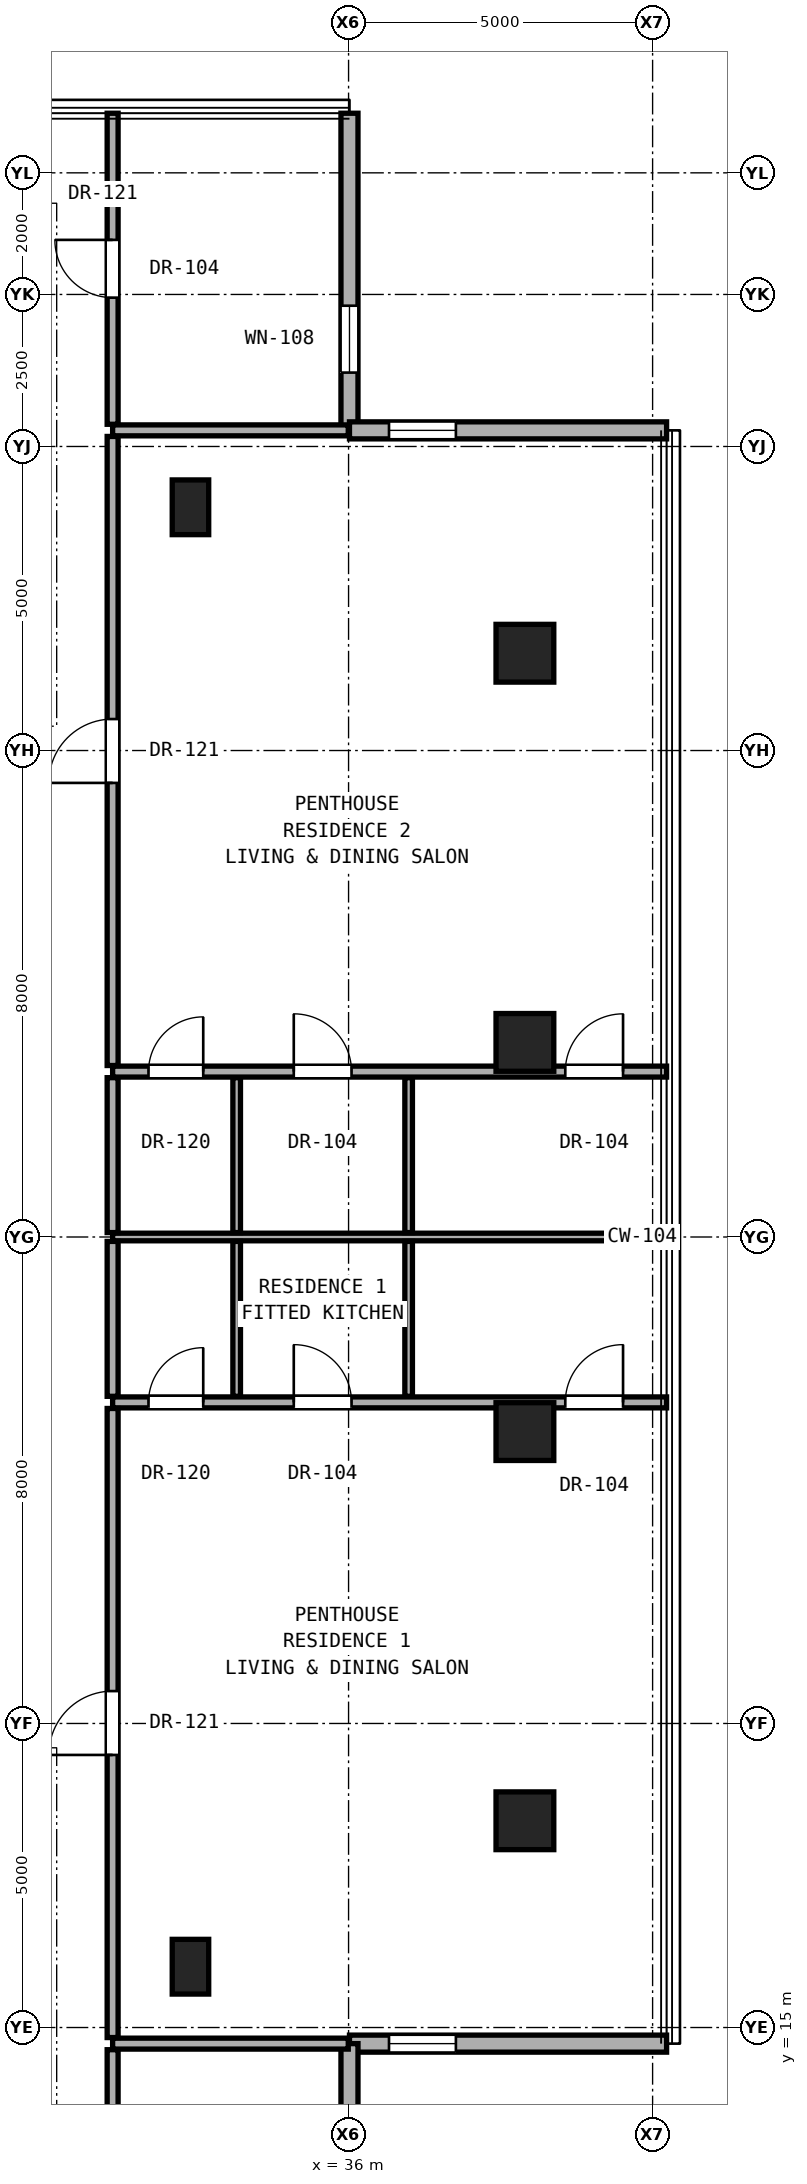
"""IFC4 building model, lengths in metres.
Left out: names, types, materials, properties, quantities, classifications, styles, units other than length and angle.
Written with IfcOpenShell. Run it as: python <this file> out.ifc"""

import sys

from ifc_helpers import new_model, si_unit, direction, frame, frame_2d, origin, origin_2d, place, context, subcontext, project, spatial, rectangle, hollow_rectangle, extrude, element, fill, save


model = new_model("IFC4")
c1 = context("Model", 3, precision=1e-05, world=origin(), true_north=direction((0.0, 1.0)))
c2 = subcontext(c1, "Body", "Model", "MODEL_VIEW")
j1 = project(units=[si_unit("LENGTHUNIT", "METRE"), si_unit("PLANEANGLEUNIT", "RADIAN")], contexts=[c1])
p1 = place(None, origin())
s1 = spatial("IfcSite", under=j1, at=p1, CompositionType="ELEMENT")
p2 = place(p1, origin())
s2 = spatial("IfcBuilding", under=s1, at=p2, CompositionType="ELEMENT")
p3 = place(p2, frame((0.0, 0.0, 199.9)))
s3 = spatial("IfcBuildingStorey", under=s2, at=p3, CompositionType="ELEMENT", Elevation=199.9)
for number, where, z_axis, x_axis in (
    (1, (38.9, 18.4, 0.0), (0.0, 0.0, 1.0), (1.0, 0.0, 0.0)),
    (2, (38.9, 24.8, 0.0), (0.0, 0.0, 1.0), (1.0, 0.0, 0.0)),
    (3, (38.9, 31.2, 0.0), (0.0, 0.0, 1.0), (1.0, 0.0, 0.0)),
    (4, (38.9, 37.6, 0.0), (0.0, 0.0, 1.0), (1.0, 0.0, 0.0)),
):
    element("IfcColumn", number, at=place(p3, frame(where, z_axis=z_axis, x_axis=x_axis)), inside=s3, PredefinedType="COLUMN", context=c2, shape_type="SweptSolid", body=[
        extrude(hollow_rectangle(XDim=0.95, YDim=0.95, WallThickness=0.05, at=origin_2d()), origin(), (0.0, 0.0, 1.0), 3.25),
    ])
for number, where, z_axis, x_axis in (
    (5, (33.4, 16.0, 0.0), (0.0, 0.0, 1.0), (1.0, 0.0, 0.0)),
    (6, (33.4, 40.0, 0.0), (0.0, 0.0, 1.0), (1.0, 0.0, 0.0)),
):
    element("IfcColumn", number, at=place(p3, frame(where, z_axis=z_axis, x_axis=x_axis)), inside=s3, PredefinedType="PILASTER", context=c2, shape_type="SweptSolid", body=[
        extrude(rectangle(XDim=0.6, YDim=0.9, at=origin_2d()), origin(), (0.0, 0.0, 1.0), 3.25),
    ])
p4 = place(p3, frame((36.015, 41.265, 0.0), z_axis=(0.0, 0.0, 1.0), x_axis=(0.0, 1.0, 0.0)))
e7 = element("IfcWall", 7, at=p4, inside=s3, PredefinedType="SOLIDWALL", context=c2, shape_type="SweptSolid", body=[
    extrude(rectangle(XDim=5.215, YDim=0.28, at=frame_2d((2.607, 0.0))), origin(), (0.0, 0.0, 1.0), 3.03),
])
p5 = place(p4, frame((0.95, 0.0, 0.85)))
e8 = element("IfcOpeningElement", 8, at=p5, cuts=e7, PredefinedType="OPENING", context=c2, shape_type="SweptSolid", body=[
    extrude(rectangle(XDim=1.1, YDim=2.0, at=frame_2d((0.55, 1.0))), frame((0.0, 0.15, 0.0), z_axis=(0.0, -1.0, 0.0), x_axis=(1.0, 0.0, 0.0)), (0.0, 0.0, 1.0), 0.3),
])
p6 = place(p3, frame((36.015, 14.735, 0.0), z_axis=(0.0, 0.0, 1.0), x_axis=(1.0, 0.0, 0.0)))
e9 = element("IfcWall", 9, at=p6, inside=s3, PredefinedType="SOLIDWALL", context=c2, shape_type="SweptSolid", body=[
    extrude(rectangle(XDim=5.215, YDim=0.28, at=frame_2d((2.607, 0.0))), origin(), (0.0, 0.0, 1.0), 3.03),
])
p7 = place(p6, frame((0.65, 0.0, 0.85)))
e10 = element("IfcOpeningElement", 10, at=p7, cuts=e9, PredefinedType="OPENING", context=c2, shape_type="SweptSolid", body=[
    extrude(rectangle(XDim=1.1, YDim=2.0, at=frame_2d((0.55, 1.0))), frame((0.0, 0.15, 0.0), z_axis=(0.0, -1.0, 0.0), x_axis=(1.0, 0.0, 0.0)), (0.0, 0.0, 1.0), 0.3),
])
p8 = place(p3, frame((36.015, 9.52, 0.0), z_axis=(0.0, 0.0, 1.0), x_axis=(0.0, 1.0, 0.0)))
e11 = element("IfcWall", 11, at=p8, inside=s3, PredefinedType="SOLIDWALL", context=c2, shape_type="SweptSolid", body=[
    extrude(rectangle(XDim=5.215, YDim=0.28, at=frame_2d((2.607, 0.0))), origin(), (0.0, 0.0, 1.0), 3.03),
])
p9 = place(p3, frame((41.23, 41.265, 0.0), z_axis=(0.0, 0.0, 1.0), x_axis=(-1.0, 0.0, 0.0)))
e12 = element("IfcWall", 12, at=p9, inside=s3, PredefinedType="SOLIDWALL", context=c2, shape_type="SweptSolid", body=[
    extrude(rectangle(XDim=5.215, YDim=0.28, at=frame_2d((2.607, 0.0))), origin(), (0.0, 0.0, 1.0), 3.03),
])
p10 = place(p9, frame((3.465, 0.0, 0.85)))
e13 = element("IfcOpeningElement", 13, at=p10, cuts=e12, PredefinedType="OPENING", context=c2, shape_type="SweptSolid", body=[
    extrude(rectangle(XDim=1.1, YDim=2.0, at=frame_2d((0.55, 1.0))), frame((0.0, 0.15, 0.0), z_axis=(0.0, -1.0, 0.0), x_axis=(1.0, 0.0, 0.0)), (0.0, 0.0, 1.0), 0.3),
])
p11 = place(p3, frame((32.12, 14.735, 0.0), z_axis=(0.0, 0.0, 1.0), x_axis=(1.0, 0.0, 0.0)))
e14 = element("IfcWall", 14, at=p11, inside=s3, PredefinedType="PARTITIONING", context=c2, shape_type="SweptSolid", body=[
    extrude(rectangle(XDim=3.875, YDim=0.18, at=frame_2d((1.938, 0.0))), origin(), (0.0, 0.0, 1.0), 3.05),
])
p12 = place(p3, frame((32.12, 25.28, 0.0), z_axis=(0.0, 0.0, 1.0), x_axis=(1.0, 0.0, 0.0)))
e15 = element("IfcWall", 15, at=p12, inside=s3, PredefinedType="PARTITIONING", context=c2, shape_type="SweptSolid", body=[
    extrude(rectangle(XDim=9.11, YDim=0.18, at=frame_2d((4.555, 0.0))), origin(), (0.0, 0.0, 1.0), 2.269),
])
p13 = place(p12, frame((7.444, 0.0, 0.0)))
e16 = element("IfcOpeningElement", 16, at=p13, cuts=e15, PredefinedType="OPENING", context=c2, shape_type="SweptSolid", body=[
    extrude(rectangle(XDim=0.95, YDim=2.15, at=frame_2d((0.475, 1.075))), frame((0.0, 0.1, 0.0), z_axis=(0.0, -1.0, 0.0), x_axis=(1.0, 0.0, 0.0)), (0.0, 0.0, 1.0), 0.2),
])
p14 = place(p12, frame((2.979, 0.0, 0.0)))
e17 = element("IfcOpeningElement", 17, at=p14, cuts=e15, PredefinedType="OPENING", context=c2, shape_type="SweptSolid", body=[
    extrude(rectangle(XDim=0.95, YDim=2.15, at=frame_2d((0.475, 1.075))), frame((0.0, 0.1, 0.0), z_axis=(0.0, -1.0, 0.0), x_axis=(1.0, 0.0, 0.0)), (0.0, 0.0, 1.0), 0.2),
])
p15 = place(p12, frame((0.59, 0.0, 0.0)))
e18 = element("IfcOpeningElement", 18, at=p15, cuts=e15, PredefinedType="OPENING", context=c2, shape_type="SweptSolid", body=[
    extrude(rectangle(XDim=0.9, YDim=2.1, at=frame_2d((0.45, 1.05))), frame((0.0, 0.1, 0.0), z_axis=(0.0, -1.0, 0.0), x_axis=(1.0, 0.0, 0.0)), (0.0, 0.0, 1.0), 0.2),
])
p16 = place(p3, frame((32.12, 28.0, 0.0), z_axis=(0.0, 0.0, 1.0), x_axis=(1.0, 0.0, 0.0)))
e19 = element("IfcWall", 19, at=p16, inside=s3, PredefinedType="PARTITIONING", context=c2, shape_type="SweptSolid", body=[
    extrude(rectangle(XDim=9.11, YDim=0.125, at=frame_2d((4.555, 0.0))), origin(), (0.0, 0.0, 1.0), 2.269),
])
p17 = place(p3, frame((32.12, 30.72, 0.0), z_axis=(0.0, 0.0, 1.0), x_axis=(1.0, 0.0, 0.0)))
e20 = element("IfcWall", 20, at=p17, inside=s3, PredefinedType="PARTITIONING", context=c2, shape_type="SweptSolid", body=[
    extrude(rectangle(XDim=9.11, YDim=0.18, at=frame_2d((4.555, 0.0))), origin(), (0.0, 0.0, 1.0), 2.269),
])
p18 = place(p17, frame((7.444, 0.0, 0.0)))
e21 = element("IfcOpeningElement", 21, at=p18, cuts=e20, PredefinedType="OPENING", context=c2, shape_type="SweptSolid", body=[
    extrude(rectangle(XDim=0.95, YDim=2.15, at=frame_2d((0.475, 1.075))), frame((0.0, 0.1, 0.0), z_axis=(0.0, -1.0, 0.0), x_axis=(1.0, 0.0, 0.0)), (0.0, 0.0, 1.0), 0.2),
])
p19 = place(p17, frame((2.979, 0.0, 0.0)))
e22 = element("IfcOpeningElement", 22, at=p19, cuts=e20, PredefinedType="OPENING", context=c2, shape_type="SweptSolid", body=[
    extrude(rectangle(XDim=0.95, YDim=2.15, at=frame_2d((0.475, 1.075))), frame((0.0, 0.1, 0.0), z_axis=(0.0, -1.0, 0.0), x_axis=(1.0, 0.0, 0.0)), (0.0, 0.0, 1.0), 0.2),
])
p20 = place(p17, frame((0.59, 0.0, 0.0)))
e23 = element("IfcOpeningElement", 23, at=p20, cuts=e20, PredefinedType="OPENING", context=c2, shape_type="SweptSolid", body=[
    extrude(rectangle(XDim=0.9, YDim=2.1, at=frame_2d((0.45, 1.05))), frame((0.0, 0.1, 0.0), z_axis=(0.0, -1.0, 0.0), x_axis=(1.0, 0.0, 0.0)), (0.0, 0.0, 1.0), 0.2),
])
p21 = place(p3, frame((32.12, 41.265, 0.0), z_axis=(0.0, 0.0, 1.0), x_axis=(1.0, 0.0, 0.0)))
e24 = element("IfcWall", 24, at=p21, inside=s3, PredefinedType="PARTITIONING", context=c2, shape_type="SweptSolid", body=[
    extrude(rectangle(XDim=3.875, YDim=0.18, at=frame_2d((1.938, 0.0))), origin(), (0.0, 0.0, 1.0), 3.05),
])
p22 = place(p3, frame((32.12, 9.52, 0.0), z_axis=(0.0, 0.0, 1.0), x_axis=(0.0, 1.0, 0.0)))
e25 = element("IfcWall", 25, at=p22, inside=s3, PredefinedType="PARTITIONING", context=c2, shape_type="SweptSolid", body=[
    extrude(rectangle(XDim=5.115, YDim=0.18, at=frame_2d((2.558, 0.0))), origin(), (0.0, 0.0, 1.0), 3.05),
])
p23 = place(p22, frame((2.083, 0.0, 0.0)))
e26 = element("IfcOpeningElement", 26, at=p23, cuts=e25, PredefinedType="OPENING", context=c2, shape_type="SweptSolid", body=[
    extrude(rectangle(XDim=0.95, YDim=2.15, at=frame_2d((0.475, 1.075))), frame((0.0, 0.1, 0.0), z_axis=(0.0, -1.0, 0.0), x_axis=(1.0, 0.0, 0.0)), (0.0, 0.0, 1.0), 0.2),
])
p24 = place(p3, frame((32.12, 14.835, 0.0), z_axis=(0.0, 0.0, 1.0), x_axis=(0.0, 1.0, 0.0)))
e27 = element("IfcWall", 27, at=p24, inside=s3, PredefinedType="PARTITIONING", context=c2, shape_type="SweptSolid", body=[
    extrude(rectangle(XDim=10.345, YDim=0.18, at=frame_2d((5.172, 0.0))), origin(), (0.0, 0.0, 1.0), 2.346),
])
p25 = place(p24, frame((4.647, 0.0, 0.0)))
e28 = element("IfcOpeningElement", 28, at=p25, cuts=e27, PredefinedType="OPENING", context=c2, shape_type="SweptSolid", body=[
    extrude(rectangle(XDim=1.05, YDim=2.2, at=frame_2d((0.525, 1.1))), frame((0.0, 0.1, 0.0), z_axis=(0.0, -1.0, 0.0), x_axis=(1.0, 0.0, 0.0)), (0.0, 0.0, 1.0), 0.2),
])
for number, where, z_axis, x_axis in (
    (29, (32.12, 25.38, 0.0), (0.0, 0.0, 1.0), (0.0, 1.0, 0.0)),
    (30, (32.12, 28.073, 0.0), (0.0, 0.0, 1.0), (0.0, 1.0, 0.0)),
):
    element("IfcWall", number, at=place(p3, frame(where, z_axis=z_axis, x_axis=x_axis)), inside=s3, PredefinedType="PARTITIONING", context=c2, shape_type="SweptSolid", body=[
        extrude(rectangle(XDim=2.548, YDim=0.18, at=frame_2d((1.274, 0.0))), origin(), (0.0, 0.0, 1.0), 3.05),
    ])
p26 = place(p3, frame((32.12, 30.82, 0.0), z_axis=(0.0, 0.0, 1.0), x_axis=(0.0, 1.0, 0.0)))
e31 = element("IfcWall", 31, at=p26, inside=s3, PredefinedType="PARTITIONING", context=c2, shape_type="SweptSolid", body=[
    extrude(rectangle(XDim=10.345, YDim=0.18, at=frame_2d((5.172, 0.0))), origin(), (0.0, 0.0, 1.0), 2.346),
])
p27 = place(p26, frame((4.647, 0.0, 0.0)))
e32 = element("IfcOpeningElement", 32, at=p27, cuts=e31, PredefinedType="OPENING", context=c2, shape_type="SweptSolid", body=[
    extrude(rectangle(XDim=1.05, YDim=2.2, at=frame_2d((0.525, 1.1))), frame((0.0, 0.1, 0.0), z_axis=(0.0, -1.0, 0.0), x_axis=(1.0, 0.0, 0.0)), (0.0, 0.0, 1.0), 0.2),
])
p28 = place(p3, frame((32.12, 41.365, 0.0), z_axis=(0.0, 0.0, 1.0), x_axis=(0.0, 1.0, 0.0)))
e33 = element("IfcWall", 33, at=p28, inside=s3, PredefinedType="PARTITIONING", context=c2, shape_type="SweptSolid", body=[
    extrude(rectangle(XDim=5.115, YDim=0.18, at=frame_2d((2.558, 0.0))), origin(), (0.0, 0.0, 1.0), 3.05),
])
p29 = place(p28, frame((2.083, 0.0, 0.0)))
e34 = element("IfcOpeningElement", 34, at=p29, cuts=e33, PredefinedType="OPENING", context=c2, shape_type="SweptSolid", body=[
    extrude(rectangle(XDim=0.95, YDim=2.15, at=frame_2d((0.475, 1.075))), frame((0.0, 0.1, 0.0), z_axis=(0.0, -1.0, 0.0), x_axis=(1.0, 0.0, 0.0)), (0.0, 0.0, 1.0), 0.2),
])
for number, where, z_axis, x_axis in (
    (35, (34.16, 25.38, 0.0), (0.0, 0.0, 1.0), (0.0, 1.0, 0.0)),
    (36, (34.16, 28.073, 0.0), (0.0, 0.0, 1.0), (0.0, 1.0, 0.0)),
    (37, (36.988, 25.38, 0.0), (0.0, 0.0, 1.0), (0.0, 1.0, 0.0)),
    (38, (36.988, 28.073, 0.0), (0.0, 0.0, 1.0), (0.0, 1.0, 0.0)),
):
    element("IfcWall", number, at=place(p3, frame(where, z_axis=z_axis, x_axis=x_axis)), inside=s3, PredefinedType="PARTITIONING", context=c2, shape_type="SweptSolid", body=[
        extrude(rectangle(XDim=2.548, YDim=0.125, at=frame_2d((1.274, 0.0))), origin(), (0.0, 0.0, 1.0), 3.05),
    ])
p30 = place(p5, origin())
e39 = element("IfcWindow", 39, at=p30, inside=s3, PartitioningType="SINGLE_PANEL", PredefinedType="WINDOW", context=c2, shape_type="SweptSolid", body=[
    extrude(rectangle(XDim=1.1, YDim=2.0, at=frame_2d((0.55, 1.0))), frame((0.0, 0.03, 0.0), z_axis=(0.0, -1.0, 0.0), x_axis=(1.0, 0.0, 0.0)), (0.0, 0.0, 1.0), 0.06),
])
fill(e8, e39)
p31 = place(p7, origin())
e40 = element("IfcWindow", 40, at=p31, inside=s3, PartitioningType="SINGLE_PANEL", PredefinedType="WINDOW", context=c2, shape_type="SweptSolid", body=[
    extrude(rectangle(XDim=1.1, YDim=2.0, at=frame_2d((0.55, 1.0))), frame((0.0, 0.03, 0.0), z_axis=(0.0, -1.0, 0.0), x_axis=(1.0, 0.0, 0.0)), (0.0, 0.0, 1.0), 0.06),
])
fill(e10, e40)
p32 = place(p10, origin())
e41 = element("IfcWindow", 41, at=p32, inside=s3, PartitioningType="SINGLE_PANEL", PredefinedType="WINDOW", context=c2, shape_type="SweptSolid", body=[
    extrude(rectangle(XDim=1.1, YDim=2.0, at=frame_2d((0.55, 1.0))), frame((0.0, 0.03, 0.0), z_axis=(0.0, -1.0, 0.0), x_axis=(1.0, 0.0, 0.0)), (0.0, 0.0, 1.0), 0.06),
])
fill(e13, e41)
p33 = place(p25, origin())
e42 = element("IfcDoor", 42, at=p33, inside=s3, OperationType="SINGLE_SWING_LEFT", PredefinedType="DOOR", context=c2, shape_type="SweptSolid", body=[
    extrude(rectangle(XDim=1.05, YDim=2.2, at=frame_2d((0.525, 1.1))), frame((0.0, 0.025, 0.0), z_axis=(0.0, -1.0, 0.0), x_axis=(1.0, 0.0, 0.0)), (0.0, 0.0, 1.0), 0.05),
])
fill(e28, e42)
p34 = place(p13, origin())
e43 = element("IfcDoor", 43, at=p34, inside=s3, OperationType="SINGLE_SWING_RIGHT", PredefinedType="DOOR", context=c2, shape_type="SweptSolid", body=[
    extrude(rectangle(XDim=0.95, YDim=2.15, at=frame_2d((0.475, 1.075))), frame((0.0, 0.025, 0.0), z_axis=(0.0, -1.0, 0.0), x_axis=(1.0, 0.0, 0.0)), (0.0, 0.0, 1.0), 0.05),
])
fill(e16, e43)
p35 = place(p14, origin())
e44 = element("IfcDoor", 44, at=p35, inside=s3, OperationType="SINGLE_SWING_LEFT", PredefinedType="DOOR", context=c2, shape_type="SweptSolid", body=[
    extrude(rectangle(XDim=0.95, YDim=2.15, at=frame_2d((0.475, 1.075))), frame((0.0, 0.025, 0.0), z_axis=(0.0, -1.0, 0.0), x_axis=(1.0, 0.0, 0.0)), (0.0, 0.0, 1.0), 0.05),
])
fill(e17, e44)
p36 = place(p15, origin())
e45 = element("IfcDoor", 45, at=p36, inside=s3, OperationType="SINGLE_SWING_RIGHT", PredefinedType="DOOR", context=c2, shape_type="SweptSolid", body=[
    extrude(rectangle(XDim=0.9, YDim=2.1, at=frame_2d((0.45, 1.05))), frame((0.0, 0.025, 0.0), z_axis=(0.0, -1.0, 0.0), x_axis=(1.0, 0.0, 0.0)), (0.0, 0.0, 1.0), 0.05),
])
fill(e18, e45)
p37 = place(p27, origin())
e46 = element("IfcDoor", 46, at=p37, inside=s3, OperationType="SINGLE_SWING_LEFT", PredefinedType="DOOR", context=c2, shape_type="SweptSolid", body=[
    extrude(rectangle(XDim=1.05, YDim=2.2, at=frame_2d((0.525, 1.1))), frame((0.0, 0.025, 0.0), z_axis=(0.0, -1.0, 0.0), x_axis=(1.0, 0.0, 0.0)), (0.0, 0.0, 1.0), 0.05),
])
fill(e32, e46)
p38 = place(p18, origin())
e47 = element("IfcDoor", 47, at=p38, inside=s3, OperationType="SINGLE_SWING_RIGHT", PredefinedType="DOOR", context=c2, shape_type="SweptSolid", body=[
    extrude(rectangle(XDim=0.95, YDim=2.15, at=frame_2d((0.475, 1.075))), frame((0.0, 0.025, 0.0), z_axis=(0.0, -1.0, 0.0), x_axis=(1.0, 0.0, 0.0)), (0.0, 0.0, 1.0), 0.05),
])
fill(e21, e47)
p39 = place(p19, origin())
e48 = element("IfcDoor", 48, at=p39, inside=s3, OperationType="SINGLE_SWING_LEFT", PredefinedType="DOOR", context=c2, shape_type="SweptSolid", body=[
    extrude(rectangle(XDim=0.95, YDim=2.15, at=frame_2d((0.475, 1.075))), frame((0.0, 0.025, 0.0), z_axis=(0.0, -1.0, 0.0), x_axis=(1.0, 0.0, 0.0)), (0.0, 0.0, 1.0), 0.05),
])
fill(e22, e48)
p40 = place(p20, origin())
e49 = element("IfcDoor", 49, at=p40, inside=s3, OperationType="SINGLE_SWING_RIGHT", PredefinedType="DOOR", context=c2, shape_type="SweptSolid", body=[
    extrude(rectangle(XDim=0.9, YDim=2.1, at=frame_2d((0.45, 1.05))), frame((0.0, 0.025, 0.0), z_axis=(0.0, -1.0, 0.0), x_axis=(1.0, 0.0, 0.0)), (0.0, 0.0, 1.0), 0.05),
])
fill(e23, e49)
p41 = place(p29, origin())
e50 = element("IfcDoor", 50, at=p41, inside=s3, OperationType="SINGLE_SWING_RIGHT", PredefinedType="DOOR", context=c2, shape_type="SweptSolid", body=[
    extrude(rectangle(XDim=0.95, YDim=2.15, at=frame_2d((0.475, 1.075))), frame((0.0, 0.025, 0.0), z_axis=(0.0, -1.0, 0.0), x_axis=(1.0, 0.0, 0.0)), (0.0, 0.0, 1.0), 0.05),
])
fill(e34, e50)
save(model, sys.argv[1])
